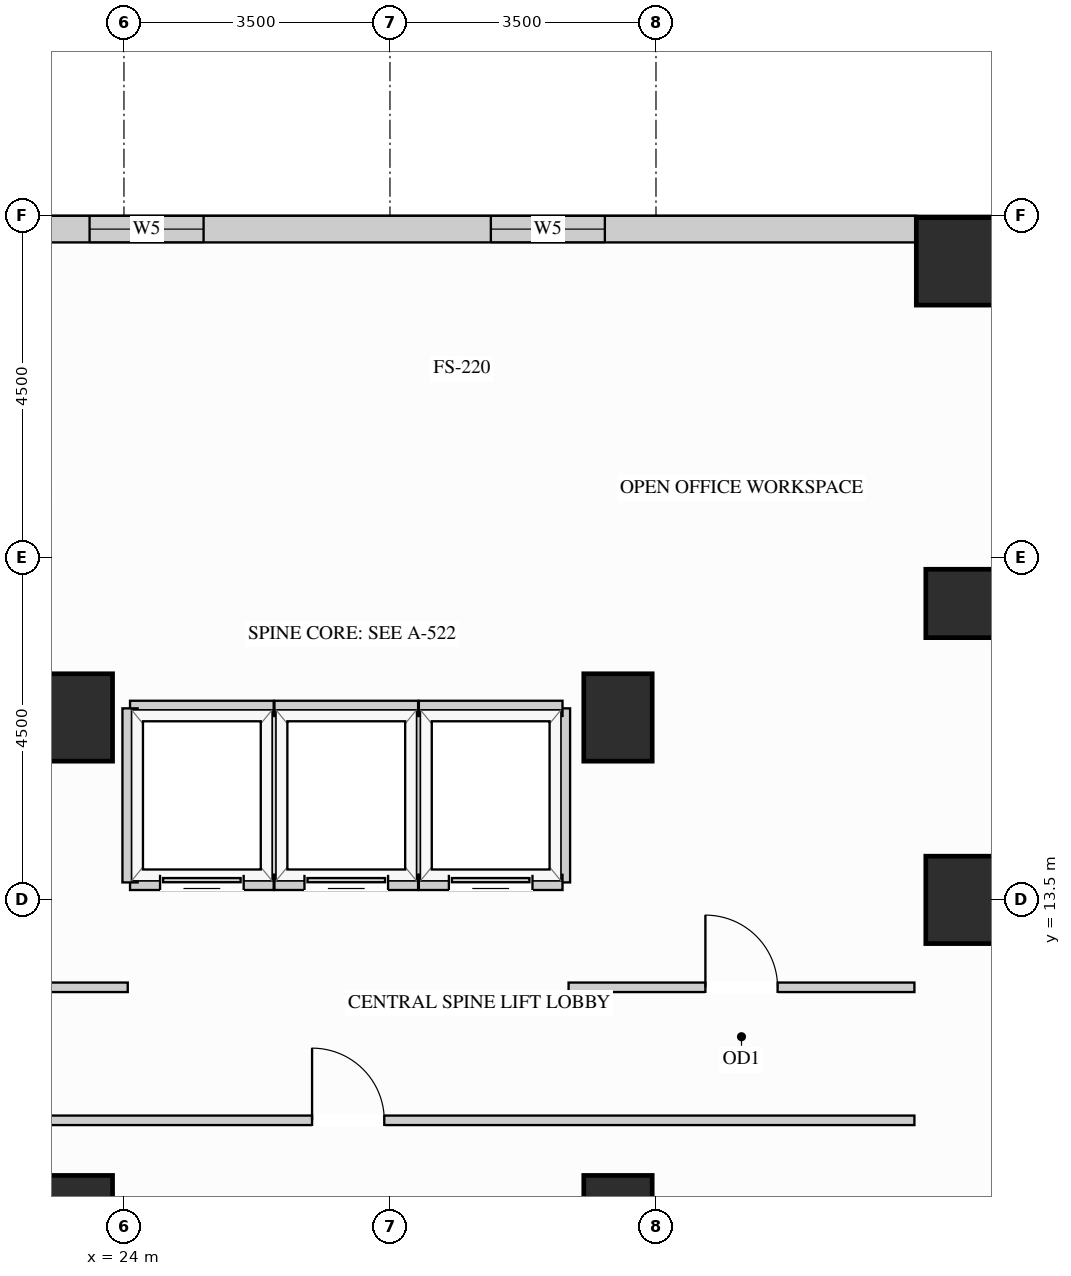
"""IFC4 building model, lengths in metres.
Left out: names, types, materials, properties, quantities, classifications, styles, units other than length and angle.
Written with IfcOpenShell. Run it as: python <this file> out.ifc"""

import sys

from ifc_helpers import new_model, si_unit, direction, frame, frame_2d, origin, origin_2d, place, context, subcontext, project, spatial, rectangle, extrude, source, transform, mapped, element, fill, save


model = new_model("IFC4")
c1 = context("Model", 3, precision=1e-05, world=origin(), true_north=direction((0.0, 1.0)))
c2 = subcontext(c1, "Body", "Model", "MODEL_VIEW")
j1 = project(units=[si_unit("LENGTHUNIT", "METRE"), si_unit("PLANEANGLEUNIT", "RADIAN")], contexts=[c1])
p1 = place(None, origin())
s1 = spatial("IfcSite", under=j1, at=p1, CompositionType="ELEMENT")
p2 = place(p1, origin())
s2 = spatial("IfcBuilding", under=s1, at=p2, CompositionType="ELEMENT")
p3 = place(p2, frame((0.0, 0.0, 81.0)))
s3 = spatial("IfcBuildingStorey", under=s2, at=p3, CompositionType="ELEMENT", Elevation=81.0)
m1 = source(origin(), c2, "Body", "SweptSolid", [
    extrude(rectangle(XDim=0.9, YDim=0.9, at=origin_2d()), origin(), (0.0, 0.0, 1.0), 3.38),
])
p4 = place(p3, frame((35.0, 17.4, 0.0), z_axis=(0.0, 0.0, 1.0), x_axis=(1.0, 0.0, 0.0)))
e1 = element("IfcColumn", 1, at=p4, inside=s3, PredefinedType="COLUMN", context=c2, shape_type="MappedRepresentation", body=[
    mapped(m1, transform((0.0, 0.0, 0.0), x_axis=(1.0, 0.0, 0.0), y_axis=(0.0, 1.0, 0.0), z_axis=(0.0, 0.0, 1.0))),
])
m2 = source(origin(), c2, "Body", "SweptSolid", [
    extrude(rectangle(XDim=0.9, YDim=1.15, at=origin_2d()), origin(), (0.0, 0.0, 1.0), 3.38),
])
for number, where, z_axis, x_axis in (
    (2, (35.0, 13.5, 0.0), (0.0, 0.0, 1.0), (1.0, 0.0, 0.0)),
    (3, (23.4, 15.9, 0.0), (0.0, 0.0, 1.0), (1.0, 0.0, 0.0)),
    (4, (23.4, 9.3, 0.0), (0.0, 0.0, 1.0), (1.0, 0.0, 0.0)),
    (5, (30.5, 15.9, 0.0), (0.0, 0.0, 1.0), (1.0, 0.0, 0.0)),
    (6, (30.5, 9.3, 0.0), (0.0, 0.0, 1.0), (1.0, 0.0, 0.0)),
):
    element("IfcColumn", number, at=place(p3, frame(where, z_axis=z_axis, x_axis=x_axis)), inside=s3, PredefinedType="COLUMN", context=c2, shape_type="MappedRepresentation", body=[
        mapped(m2, transform((0.0, 0.0, 0.0), x_axis=(1.0, 0.0, 0.0), y_axis=(0.0, 1.0, 0.0), z_axis=(0.0, 0.0, 1.0))),
    ])
m3 = source(origin(), c2, "Body", "SweptSolid", [
    extrude(rectangle(XDim=1.15, YDim=1.15, at=origin_2d()), origin(), (0.0, 0.0, 1.0), 3.38),
])
p5 = place(p3, frame((35.0, 21.9, 0.0), z_axis=(0.0, 0.0, 1.0), x_axis=(1.0, 0.0, 0.0)))
e7 = element("IfcColumn", 7, at=p5, inside=s3, PredefinedType="COLUMN", context=c2, shape_type="MappedRepresentation", body=[
    mapped(m3, transform((0.0, 0.0, 0.0), x_axis=(1.0, 0.0, 0.0), y_axis=(0.0, 1.0, 0.0), z_axis=(0.0, 0.0, 1.0))),
])
p6 = place(p3, frame((34.427, 22.325, 0.0), z_axis=(0.0, 0.0, 1.0), x_axis=(-1.0, 0.0, 0.0)))
e8 = element("IfcWall", 8, at=p6, inside=s3, PredefinedType="SOLIDWALL", context=c2, shape_type="SweptSolid", body=[
    extrude(rectangle(XDim=14.979, YDim=0.35, at=frame_2d((7.49, 0.0))), origin(), (0.0, 0.0, 1.0), 3.365),
])
p7 = place(p6, frame((4.1, 0.0, 0.78)))
e9 = element("IfcOpeningElement", 9, at=p7, cuts=e8, PredefinedType="OPENING", context=c2, shape_type="SweptSolid", body=[
    extrude(rectangle(XDim=1.5, YDim=2.0, at=frame_2d((0.75, 1.0))), frame((0.0, 0.185, 0.0), z_axis=(0.0, -1.0, 0.0), x_axis=(1.0, 0.0, 0.0)), (0.0, 0.0, 1.0), 0.37),
])
p8 = place(p6, frame((9.379, 0.0, 0.78)))
e10 = element("IfcOpeningElement", 10, at=p8, cuts=e8, PredefinedType="OPENING", context=c2, shape_type="SweptSolid", body=[
    extrude(rectangle(XDim=1.5, YDim=2.0, at=frame_2d((0.75, 1.0))), frame((0.0, 0.185, 0.0), z_axis=(0.0, -1.0, 0.0), x_axis=(1.0, 0.0, 0.0)), (0.0, 0.0, 1.0), 0.37),
])
p9 = place(p3, frame((29.85, 12.35, 0.0), z_axis=(0.0, 0.0, 1.0), x_axis=(1.0, 0.0, 0.0)))
e11 = element("IfcWall", 11, at=p9, inside=s3, PredefinedType="PARTITIONING", context=c2, shape_type="SweptSolid", body=[
    extrude(rectangle(XDim=4.55, YDim=0.125, at=frame_2d((2.275, 0.0))), origin(), (0.0, 0.0, 1.0), 3.365),
])
p10 = place(p9, frame((1.8, 0.0, 0.0)))
e12 = element("IfcOpeningElement", 12, at=p10, cuts=e11, PredefinedType="OPENING", context=c2, shape_type="SweptSolid", body=[
    extrude(rectangle(XDim=0.95, YDim=2.15, at=frame_2d((0.475, 1.075))), frame((0.0, 0.073, 0.0), z_axis=(0.0, -1.0, 0.0), x_axis=(1.0, 0.0, 0.0)), (0.0, 0.0, 1.0), 0.145),
])
p11 = place(p3, frame((19.5, 12.35, 0.0), z_axis=(0.0, 0.0, 1.0), x_axis=(1.0, 0.0, 0.0)))
e13 = element("IfcWall", 13, at=p11, inside=s3, PredefinedType="PARTITIONING", context=c2, shape_type="SweptSolid", body=[
    extrude(rectangle(XDim=4.55, YDim=0.125, at=frame_2d((2.275, 0.0))), origin(), (0.0, 0.0, 1.0), 3.365),
])
p12 = place(p11, frame((1.8, 0.0, 0.0)))
e14 = element("IfcOpeningElement", 14, at=p12, cuts=e13, PredefinedType="OPENING", context=c2, shape_type="SweptSolid", body=[
    extrude(rectangle(XDim=0.95, YDim=2.15, at=frame_2d((0.475, 1.075))), frame((0.0, 0.073, 0.0), z_axis=(0.0, -1.0, 0.0), x_axis=(1.0, 0.0, 0.0)), (0.0, 0.0, 1.0), 0.145),
])
p13 = place(p3, frame((19.5, 10.6, 0.0), z_axis=(0.0, 0.0, 1.0), x_axis=(1.0, 0.0, 0.0)))
e15 = element("IfcWall", 15, at=p13, inside=s3, PredefinedType="PARTITIONING", context=c2, shape_type="SweptSolid", body=[
    extrude(rectangle(XDim=14.9, YDim=0.125, at=frame_2d((7.45, 0.0))), origin(), (0.0, 0.0, 1.0), 3.365),
])
p14 = place(p13, frame((6.975, 0.0, 0.0)))
e16 = element("IfcOpeningElement", 16, at=p14, cuts=e15, PredefinedType="OPENING", context=c2, shape_type="SweptSolid", body=[
    extrude(rectangle(XDim=0.95, YDim=2.15, at=frame_2d((0.475, 1.075))), frame((0.0, 0.073, 0.0), z_axis=(0.0, -1.0, 0.0), x_axis=(1.0, 0.0, 0.0)), (0.0, 0.0, 1.0), 0.145),
])
m4 = source(origin(), c2, "Body", "SweptSolid", [
    extrude(rectangle(XDim=2.29, YDim=0.2, at=frame_2d((1.145, 0.0))), origin(), (0.0, 0.0, 1.0), 3.365),
])
p15 = place(p3, frame((25.97, 13.73, 0.0), z_axis=(0.0, 0.0, 1.0), x_axis=(0.0, 1.0, 0.0)))
e17 = element("IfcWall", 17, at=p15, inside=s3, PredefinedType="PARTITIONING", context=c2, shape_type="MappedRepresentation", body=[
    mapped(m4, transform((0.0, 0.0, 0.0), x_axis=(1.0, 0.0, 0.0), y_axis=(0.0, 1.0, 0.0), z_axis=(0.0, 0.0, 1.0))),
])
m5 = source(origin(), c2, "Body", "SweptSolid", [
    extrude(rectangle(XDim=1.89, YDim=0.2, at=frame_2d((0.945, 0.0))), origin(), (0.0, 0.0, 1.0), 2.677),
])
p16 = place(p3, frame((24.08, 16.02, 0.0), z_axis=(0.0, 0.0, 1.0), x_axis=(1.0, 0.0, 0.0)))
e18 = element("IfcWall", 18, at=p16, inside=s3, PredefinedType="PARTITIONING", context=c2, shape_type="MappedRepresentation", body=[
    mapped(m5, transform((0.0, 0.0, 0.0), x_axis=(1.0, 0.0, 0.0), y_axis=(0.0, 1.0, 0.0), z_axis=(0.0, 0.0, 1.0))),
])
p17 = place(p3, frame((24.08, 13.73, 0.0), z_axis=(0.0, 0.0, 1.0), x_axis=(1.0, 0.0, 0.0)))
e19 = element("IfcWall", 19, at=p17, inside=s3, PredefinedType="PARTITIONING", context=c2, shape_type="SweptSolid", body=[
    extrude(rectangle(XDim=1.89, YDim=0.2, at=frame_2d((0.945, 0.0))), origin(), (0.0, 0.0, 1.0), 2.446),
])
p18 = place(p17, frame((0.395, 0.0, 0.0)))
e20 = element("IfcOpeningElement", 20, at=p18, cuts=e19, PredefinedType="OPENING", context=c2, shape_type="SweptSolid", body=[
    extrude(rectangle(XDim=1.1, YDim=2.2, at=frame_2d((0.55, 1.1))), frame((0.0, 0.11, 0.0), z_axis=(0.0, -1.0, 0.0), x_axis=(1.0, 0.0, 0.0)), (0.0, 0.0, 1.0), 0.22),
])
for number, where, z_axis, x_axis in (
    (21, (24.08, 13.73, 0.0), (0.0, 0.0, 1.0), (0.0, 1.0, 0.0)),
    (22, (27.87, 13.73, 0.0), (0.0, 0.0, 1.0), (0.0, 1.0, 0.0)),
):
    element("IfcWall", number, at=place(p3, frame(where, z_axis=z_axis, x_axis=x_axis)), inside=s3, PredefinedType="PARTITIONING", context=c2, shape_type="MappedRepresentation", body=[
        mapped(m4, transform((0.0, 0.0, 0.0), x_axis=(1.0, 0.0, 0.0), y_axis=(0.0, 1.0, 0.0), z_axis=(0.0, 0.0, 1.0))),
    ])
m6 = source(origin(), c2, "Body", "SweptSolid", [
    extrude(rectangle(XDim=1.89, YDim=0.2, at=frame_2d((0.945, 0.0))), origin(), (0.0, 0.0, 1.0), 2.677),
])
p19 = place(p3, frame((25.98, 16.02, 0.0), z_axis=(0.0, 0.0, 1.0), x_axis=(1.0, 0.0, 0.0)))
e23 = element("IfcWall", 23, at=p19, inside=s3, PredefinedType="PARTITIONING", context=c2, shape_type="MappedRepresentation", body=[
    mapped(m6, transform((0.0, 0.0, 0.0), x_axis=(1.0, 0.0, 0.0), y_axis=(0.0, 1.0, 0.0), z_axis=(0.0, 0.0, 1.0))),
])
p20 = place(p3, frame((25.98, 13.73, 0.0), z_axis=(0.0, 0.0, 1.0), x_axis=(1.0, 0.0, 0.0)))
e24 = element("IfcWall", 24, at=p20, inside=s3, PredefinedType="PARTITIONING", context=c2, shape_type="SweptSolid", body=[
    extrude(rectangle(XDim=1.89, YDim=0.2, at=frame_2d((0.945, 0.0))), origin(), (0.0, 0.0, 1.0), 2.446),
])
p21 = place(p20, frame((0.395, 0.0, 0.0)))
e25 = element("IfcOpeningElement", 25, at=p21, cuts=e24, PredefinedType="OPENING", context=c2, shape_type="SweptSolid", body=[
    extrude(rectangle(XDim=1.1, YDim=2.2, at=frame_2d((0.55, 1.1))), frame((0.0, 0.11, 0.0), z_axis=(0.0, -1.0, 0.0), x_axis=(1.0, 0.0, 0.0)), (0.0, 0.0, 1.0), 0.22),
])
p22 = place(p3, frame((29.77, 13.73, 0.0), z_axis=(0.0, 0.0, 1.0), x_axis=(0.0, 1.0, 0.0)))
e26 = element("IfcWall", 26, at=p22, inside=s3, PredefinedType="PARTITIONING", context=c2, shape_type="MappedRepresentation", body=[
    mapped(m4, transform((0.0, 0.0, 0.0), x_axis=(1.0, 0.0, 0.0), y_axis=(0.0, 1.0, 0.0), z_axis=(0.0, 0.0, 1.0))),
])
p23 = place(p3, frame((27.88, 16.02, 0.0), z_axis=(0.0, 0.0, 1.0), x_axis=(1.0, 0.0, 0.0)))
e27 = element("IfcWall", 27, at=p23, inside=s3, PredefinedType="PARTITIONING", context=c2, shape_type="MappedRepresentation", body=[
    mapped(m6, transform((0.0, 0.0, 0.0), x_axis=(1.0, 0.0, 0.0), y_axis=(0.0, 1.0, 0.0), z_axis=(0.0, 0.0, 1.0))),
])
p24 = place(p3, frame((27.88, 13.73, 0.0), z_axis=(0.0, 0.0, 1.0), x_axis=(1.0, 0.0, 0.0)))
e28 = element("IfcWall", 28, at=p24, inside=s3, PredefinedType="PARTITIONING", context=c2, shape_type="SweptSolid", body=[
    extrude(rectangle(XDim=1.89, YDim=0.2, at=frame_2d((0.945, 0.0))), origin(), (0.0, 0.0, 1.0), 2.446),
])
p25 = place(p24, frame((0.395, 0.0, 0.0)))
e29 = element("IfcOpeningElement", 29, at=p25, cuts=e28, PredefinedType="OPENING", context=c2, shape_type="SweptSolid", body=[
    extrude(rectangle(XDim=1.1, YDim=2.2, at=frame_2d((0.55, 1.1))), frame((0.0, 0.11, 0.0), z_axis=(0.0, -1.0, 0.0), x_axis=(1.0, 0.0, 0.0)), (0.0, 0.0, 1.0), 0.22),
])
m7 = source(origin(), c2, "Body", "SweptSolid", [
    extrude(rectangle(XDim=1.1, YDim=2.2, at=frame_2d((0.55, 1.1))), frame((0.0, 0.025, 0.0), z_axis=(0.0, -1.0, 0.0), x_axis=(1.0, 0.0, 0.0)), (0.0, 0.0, 1.0), 0.05),
])
p26 = place(p18, origin())
e30 = element("IfcDoor", 30, at=p26, inside=s3, OperationType="SLIDING_TO_LEFT", PredefinedType="DOOR", context=c2, shape_type="MappedRepresentation", body=[
    mapped(m7, transform((0.0, 0.0, 0.0), x_axis=(1.0, 0.0, 0.0), y_axis=(0.0, 1.0, 0.0), z_axis=(0.0, 0.0, 1.0))),
])
fill(e20, e30)
p27 = place(p21, origin())
e31 = element("IfcDoor", 31, at=p27, inside=s3, OperationType="SLIDING_TO_LEFT", PredefinedType="DOOR", context=c2, shape_type="MappedRepresentation", body=[
    mapped(m7, transform((0.0, 0.0, 0.0), x_axis=(1.0, 0.0, 0.0), y_axis=(0.0, 1.0, 0.0), z_axis=(0.0, 0.0, 1.0))),
])
fill(e25, e31)
p28 = place(p25, origin())
e32 = element("IfcDoor", 32, at=p28, inside=s3, OperationType="SLIDING_TO_LEFT", PredefinedType="DOOR", context=c2, shape_type="MappedRepresentation", body=[
    mapped(m7, transform((0.0, 0.0, 0.0), x_axis=(1.0, 0.0, 0.0), y_axis=(0.0, 1.0, 0.0), z_axis=(0.0, 0.0, 1.0))),
])
fill(e29, e32)
m8 = source(origin(), c2, "Body", "SweptSolid", [
    extrude(rectangle(XDim=0.95, YDim=2.15, at=frame_2d((0.475, 1.075))), frame((0.0, 0.025, 0.0), z_axis=(0.0, -1.0, 0.0), x_axis=(1.0, 0.0, 0.0)), (0.0, 0.0, 1.0), 0.05),
])
p29 = place(p10, origin())
e33 = element("IfcDoor", 33, at=p29, inside=s3, OperationType="SINGLE_SWING_LEFT", PredefinedType="DOOR", context=c2, shape_type="MappedRepresentation", body=[
    mapped(m8, transform((0.0, 0.0, 0.0), x_axis=(1.0, 0.0, 0.0), y_axis=(0.0, 1.0, 0.0), z_axis=(0.0, 0.0, 1.0))),
])
fill(e12, e33)
p30 = place(p14, origin())
e34 = element("IfcDoor", 34, at=p30, inside=s3, OperationType="SINGLE_SWING_LEFT", PredefinedType="DOOR", context=c2, shape_type="MappedRepresentation", body=[
    mapped(m8, transform((0.0, 0.0, 0.0), x_axis=(1.0, 0.0, 0.0), y_axis=(0.0, 1.0, 0.0), z_axis=(0.0, 0.0, 1.0))),
])
fill(e16, e34)
m9 = source(origin(), c2, "Body", "SweptSolid", [
    extrude(rectangle(XDim=1.5, YDim=2.0, at=frame_2d((0.75, 1.0))), frame((0.0, 0.03, 0.0), z_axis=(0.0, -1.0, 0.0), x_axis=(1.0, 0.0, 0.0)), (0.0, 0.0, 1.0), 0.06),
])
p31 = place(p7, origin())
e35 = element("IfcWindow", 35, at=p31, inside=s3, PartitioningType="SINGLE_PANEL", PredefinedType="WINDOW", context=c2, shape_type="MappedRepresentation", body=[
    mapped(m9, transform((0.0, 0.0, 0.0), x_axis=(1.0, 0.0, 0.0), y_axis=(0.0, 1.0, 0.0), z_axis=(0.0, 0.0, 1.0))),
])
fill(e9, e35)
p32 = place(p8, origin())
e36 = element("IfcWindow", 36, at=p32, inside=s3, PartitioningType="SINGLE_PANEL", PredefinedType="WINDOW", context=c2, shape_type="MappedRepresentation", body=[
    mapped(m9, transform((0.0, 0.0, 0.0), x_axis=(1.0, 0.0, 0.0), y_axis=(0.0, 1.0, 0.0), z_axis=(0.0, 0.0, 1.0))),
])
fill(e10, e36)
save(model, sys.argv[1])
